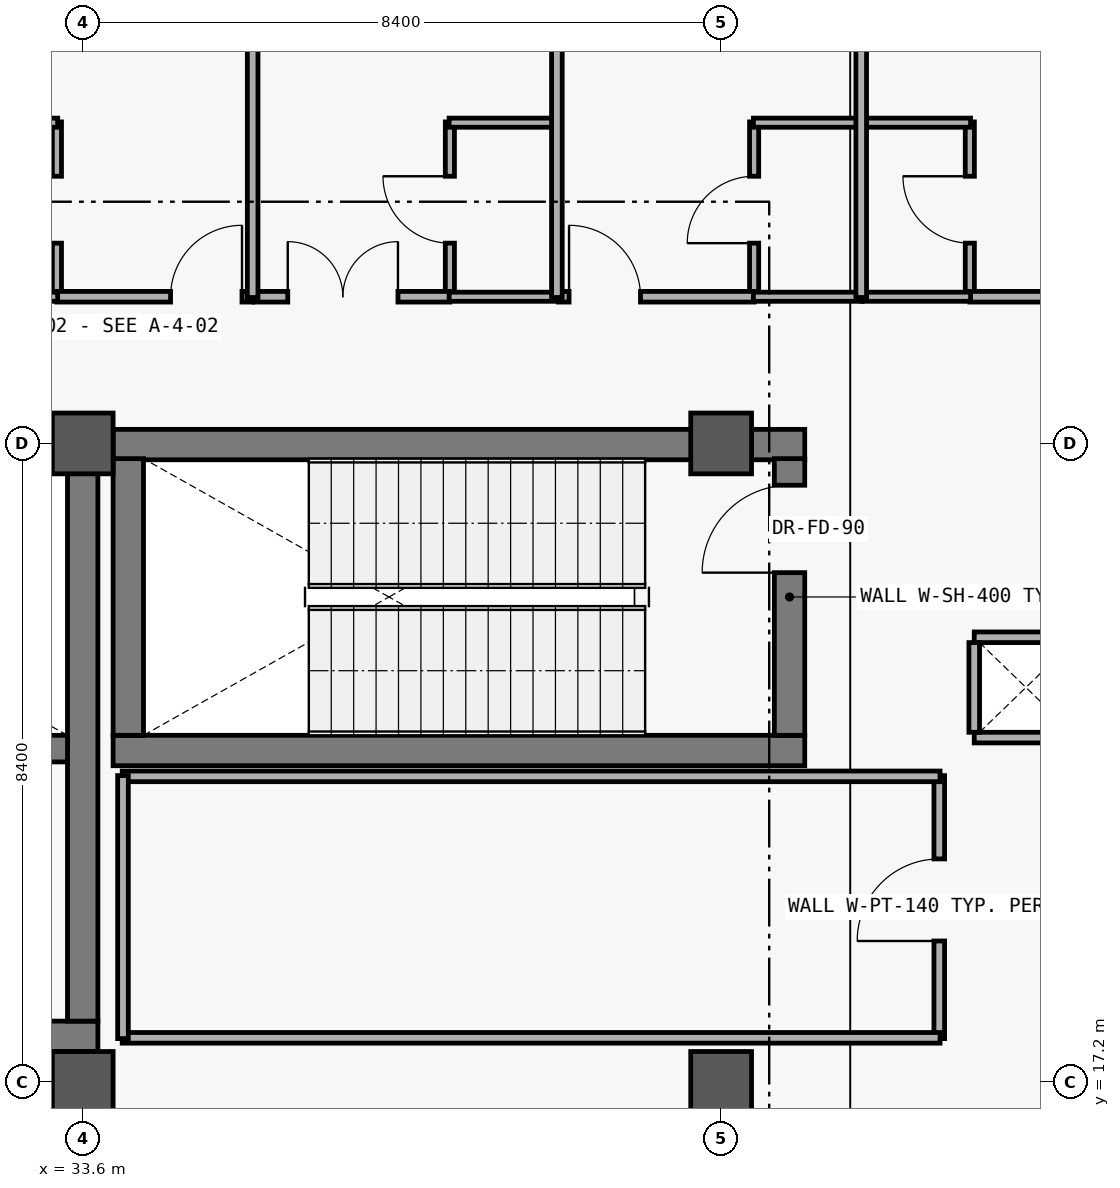
"""IFC4 building model, lengths in metres.
Left out: names, types, materials, properties, quantities, classifications, styles, units other than length and angle.
Written with IfcOpenShell. Run it as: python <this file> out.ifc"""

import sys

from ifc_helpers import new_model, si_unit, direction, frame, frame_2d, origin, origin_2d, place, context, subcontext, project, spatial, rectangle, extrude, element, fill, save


model = new_model("IFC4")
c1 = context("Model", 3, precision=1e-05, world=origin(), true_north=direction((0.0, 1.0)))
c2 = subcontext(c1, "Body", "Model", "MODEL_VIEW")
j1 = project(units=[si_unit("LENGTHUNIT", "METRE"), si_unit("PLANEANGLEUNIT", "RADIAN")], contexts=[c1])
p1 = place(None, origin())
s1 = spatial("IfcSite", under=j1, at=p1, CompositionType="ELEMENT")
p2 = place(p1, origin())
s2 = spatial("IfcBuilding", under=s1, at=p2, CompositionType="ELEMENT")
p3 = place(p2, frame((0.0, 0.0, 5.4)))
s3 = spatial("IfcBuildingStorey", under=s2, at=p3, CompositionType="ELEMENT", Elevation=5.4)
for number, where, z_axis, x_axis in (
    (1, (33.6, 17.2, 0.0), (0.0, 0.0, 1.0), (1.0, 0.0, 0.0)),
    (2, (33.6, 25.6, 0.0), (0.0, 0.0, 1.0), (1.0, 0.0, 0.0)),
    (3, (42.0, 17.2, 0.0), (0.0, 0.0, 1.0), (1.0, 0.0, 0.0)),
    (4, (42.0, 25.6, 0.0), (0.0, 0.0, 1.0), (1.0, 0.0, 0.0)),
):
    element("IfcColumn", number, at=place(p3, frame(where, z_axis=z_axis, x_axis=x_axis)), inside=s3, PredefinedType="COLUMN", context=c2, shape_type="SweptSolid", body=[
        extrude(rectangle(XDim=0.8, YDim=0.8, at=origin_2d()), origin(), (0.0, 0.0, 1.0), 5.4),
    ])
p4 = place(p3, frame((24.6, 17.8, 0.0), z_axis=(0.0, 0.0, 1.0), x_axis=(1.0, 0.0, 0.0)))
e5 = element("IfcWall", 5, at=p4, inside=s3, PredefinedType="SHEAR", context=c2, shape_type="SweptSolid", body=[
    extrude(rectangle(XDim=9.2, YDim=0.4, at=frame_2d((4.6, 0.0))), origin(), (0.0, 0.0, 1.0), 5.08),
])
p5 = place(p4, frame((1.1, 0.0, 0.0)))
e6 = element("IfcOpeningElement", 6, at=p5, cuts=e5, PredefinedType="OPENING", context=c2, shape_type="SweptSolid", body=[
    extrude(rectangle(XDim=1.2, YDim=2.2, at=frame_2d((0.6, 1.1))), frame((0.0, 0.21, 0.0), z_axis=(0.0, -1.0, 0.0), x_axis=(1.0, 0.0, 0.0)), (0.0, 0.0, 1.0), 0.42),
])
p6 = place(p4, frame((3.5, 0.0, 0.0)))
e7 = element("IfcOpeningElement", 7, at=p6, cuts=e5, PredefinedType="OPENING", context=c2, shape_type="SweptSolid", body=[
    extrude(rectangle(XDim=1.1, YDim=2.2, at=frame_2d((0.55, 1.1))), frame((0.0, 0.21, 0.0), z_axis=(0.0, -1.0, 0.0), x_axis=(1.0, 0.0, 0.0)), (0.0, 0.0, 1.0), 0.42),
])
p7 = place(p4, frame((5.9, 0.0, 0.0)))
e8 = element("IfcOpeningElement", 8, at=p7, cuts=e5, PredefinedType="OPENING", context=c2, shape_type="SweptSolid", body=[
    extrude(rectangle(XDim=1.1, YDim=2.2, at=frame_2d((0.55, 1.1))), frame((0.0, 0.21, 0.0), z_axis=(0.0, -1.0, 0.0), x_axis=(1.0, 0.0, 0.0)), (0.0, 0.0, 1.0), 0.42),
])
p8 = place(p3, frame((33.8, 25.585, 0.0), z_axis=(0.0, 0.0, 1.0), x_axis=(-1.0, 0.0, 0.0)))
e9 = element("IfcWall", 9, at=p8, inside=s3, PredefinedType="SHEAR", context=c2, shape_type="SweptSolid", body=[
    extrude(rectangle(XDim=9.2, YDim=0.4, at=frame_2d((4.6, 0.0))), origin(), (0.0, 0.0, 1.0), 5.08),
])
p9 = place(p3, frame((33.6, 18.0, 0.0), z_axis=(0.0, 0.0, 1.0), x_axis=(0.0, 1.0, 0.0)))
e10 = element("IfcWall", 10, at=p9, inside=s3, PredefinedType="SHEAR", context=c2, shape_type="SweptSolid", body=[
    extrude(rectangle(XDim=7.4, YDim=0.4, at=frame_2d((3.7, 0.0))), origin(), (0.0, 0.0, 1.0), 5.08),
])
p10 = place(p3, frame((25.0, 21.585, 0.0), z_axis=(0.0, 0.0, 1.0), x_axis=(1.0, 0.0, 0.0)))
e11 = element("IfcWall", 11, at=p10, inside=s3, PredefinedType="SHEAR", context=c2, shape_type="SweptSolid", body=[
    extrude(rectangle(XDim=8.4, YDim=0.35, at=frame_2d((4.2, 0.0))), origin(), (0.0, 0.0, 1.0), 5.08),
])
for number, where, z_axis, x_axis in (
    (12, (34.0, 21.56, 0.0), (0.0, 0.0, 1.0), (1.0, 0.0, 0.0)),
    (13, (43.1, 25.585, 0.0), (0.0, 0.0, 1.0), (-1.0, 0.0, 0.0)),
):
    element("IfcWall", number, at=place(p3, frame(where, z_axis=z_axis, x_axis=x_axis)), inside=s3, PredefinedType="SHEAR", context=c2, shape_type="SweptSolid", body=[
        extrude(rectangle(XDim=9.1, YDim=0.4, at=frame_2d((4.55, 0.0))), origin(), (0.0, 0.0, 1.0), 5.08),
    ])
p11 = place(p3, frame((34.2, 25.4, 0.0), z_axis=(0.0, 0.0, 1.0), x_axis=(0.0, -1.0, 0.0)))
e14 = element("IfcWall", 14, at=p11, inside=s3, PredefinedType="SHEAR", context=c2, shape_type="SweptSolid", body=[
    extrude(rectangle(XDim=3.64, YDim=0.4, at=frame_2d((1.82, 0.0))), origin(), (0.0, 0.0, 1.0), 5.08),
])
p12 = place(p3, frame((42.9, 21.76, 0.0), z_axis=(0.0, 0.0, 1.0), x_axis=(0.0, 1.0, 0.0)))
e15 = element("IfcWall", 15, at=p12, inside=s3, PredefinedType="SHEAR", context=c2, shape_type="SweptSolid", body=[
    extrude(rectangle(XDim=3.64, YDim=0.4, at=frame_2d((1.82, 0.0))), origin(), (0.0, 0.0, 1.0), 5.08),
])
p13 = place(p12, frame((2.14, 0.0, 0.0)))
e16 = element("IfcOpeningElement", 16, at=p13, cuts=e15, PredefinedType="OPENING", context=c2, shape_type="SweptSolid", body=[
    extrude(rectangle(XDim=1.15, YDim=2.2, at=frame_2d((0.575, 1.1))), frame((0.0, 0.21, 0.0), z_axis=(0.0, -1.0, 0.0), x_axis=(1.0, 0.0, 0.0)), (0.0, 0.0, 1.0), 0.42),
])
p14 = place(p3, frame((33.261, 27.52, 0.0), z_axis=(0.0, 0.0, 1.0), x_axis=(0.0, 1.0, 0.0)))
e17 = element("IfcWall", 17, at=p14, inside=s3, PredefinedType="PARTITIONING", context=c2, shape_type="SweptSolid", body=[
    extrude(rectangle(XDim=2.31, YDim=0.12, at=frame_2d((1.155, 0.0))), origin(), (0.0, 0.0, 1.0), 4.18),
])
p15 = place(p14, frame((0.715, 0.0, 0.0)))
e18 = element("IfcOpeningElement", 18, at=p15, cuts=e17, PredefinedType="OPENING", context=c2, shape_type="SweptSolid", body=[
    extrude(rectangle(XDim=0.88, YDim=2.15, at=frame_2d((0.44, 1.075))), frame((0.0, 0.07, 0.0), z_axis=(0.0, -1.0, 0.0), x_axis=(1.0, 0.0, 0.0)), (0.0, 0.0, 1.0), 0.14),
])
p16 = place(p3, frame((38.431, 27.52, 0.0), z_axis=(0.0, 0.0, 1.0), x_axis=(0.0, 1.0, 0.0)))
e19 = element("IfcWall", 19, at=p16, inside=s3, PredefinedType="PARTITIONING", context=c2, shape_type="SweptSolid", body=[
    extrude(rectangle(XDim=2.31, YDim=0.12, at=frame_2d((1.155, 0.0))), origin(), (0.0, 0.0, 1.0), 4.18),
])
p17 = place(p16, frame((0.715, 0.0, 0.0)))
e20 = element("IfcOpeningElement", 20, at=p17, cuts=e19, PredefinedType="OPENING", context=c2, shape_type="SweptSolid", body=[
    extrude(rectangle(XDim=0.88, YDim=2.15, at=frame_2d((0.44, 1.075))), frame((0.0, 0.07, 0.0), z_axis=(0.0, -1.0, 0.0), x_axis=(1.0, 0.0, 0.0)), (0.0, 0.0, 1.0), 0.14),
])
p18 = place(p3, frame((42.434, 27.52, 0.0), z_axis=(0.0, 0.0, 1.0), x_axis=(0.0, 1.0, 0.0)))
e21 = element("IfcWall", 21, at=p18, inside=s3, PredefinedType="PARTITIONING", context=c2, shape_type="SweptSolid", body=[
    extrude(rectangle(XDim=2.31, YDim=0.12, at=frame_2d((1.155, 0.0))), origin(), (0.0, 0.0, 1.0), 4.18),
])
p19 = place(p18, frame((0.715, 0.0, 0.0)))
e22 = element("IfcOpeningElement", 22, at=p19, cuts=e21, PredefinedType="OPENING", context=c2, shape_type="SweptSolid", body=[
    extrude(rectangle(XDim=0.88, YDim=2.15, at=frame_2d((0.44, 1.075))), frame((0.0, 0.07, 0.0), z_axis=(0.0, -1.0, 0.0), x_axis=(1.0, 0.0, 0.0)), (0.0, 0.0, 1.0), 0.14),
])
p20 = place(p3, frame((45.272, 27.52, 0.0), z_axis=(0.0, 0.0, 1.0), x_axis=(0.0, 1.0, 0.0)))
e23 = element("IfcWall", 23, at=p20, inside=s3, PredefinedType="PARTITIONING", context=c2, shape_type="SweptSolid", body=[
    extrude(rectangle(XDim=2.31, YDim=0.12, at=frame_2d((1.155, 0.0))), origin(), (0.0, 0.0, 1.0), 4.18),
])
p21 = place(p20, frame((0.715, 0.0, 0.0)))
e24 = element("IfcOpeningElement", 24, at=p21, cuts=e23, PredefinedType="OPENING", context=c2, shape_type="SweptSolid", body=[
    extrude(rectangle(XDim=0.88, YDim=2.15, at=frame_2d((0.44, 1.075))), frame((0.0, 0.07, 0.0), z_axis=(0.0, -1.0, 0.0), x_axis=(1.0, 0.0, 0.0)), (0.0, 0.0, 1.0), 0.14),
])
p22 = place(p3, frame((44.87, 17.77, 0.0), z_axis=(0.0, 0.0, 1.0), x_axis=(0.0, 1.0, 0.0)))
e25 = element("IfcWall", 25, at=p22, inside=s3, PredefinedType="PARTITIONING", context=c2, shape_type="SweptSolid", body=[
    extrude(rectangle(XDim=3.46, YDim=0.14, at=frame_2d((1.73, 0.0))), origin(), (0.0, 0.0, 1.0), 4.18),
])
p23 = place(p22, frame((1.284, 0.0, 0.0)))
e26 = element("IfcOpeningElement", 26, at=p23, cuts=e25, PredefinedType="OPENING", context=c2, shape_type="SweptSolid", body=[
    extrude(rectangle(XDim=1.08, YDim=2.25, at=frame_2d((0.54, 1.125))), frame((0.0, 0.08, 0.0), z_axis=(0.0, -1.0, 0.0), x_axis=(1.0, 0.0, 0.0)), (0.0, 0.0, 1.0), 0.16),
])
p24 = place(p3, frame((33.261, 27.53, 0.0), z_axis=(0.0, 0.0, 1.0), x_axis=(1.0, 0.0, 0.0)))
e27 = element("IfcWall", 27, at=p24, inside=s3, PredefinedType="PARTITIONING", context=c2, shape_type="SweptSolid", body=[
    extrude(rectangle(XDim=2.575, YDim=0.14, at=frame_2d((1.288, 0.0))), origin(), (0.0, 0.0, 1.0), 4.18),
])
p25 = place(p24, frame((1.495, 0.0, 0.0)))
e28 = element("IfcOpeningElement", 28, at=p25, cuts=e27, PredefinedType="OPENING", context=c2, shape_type="SweptSolid", body=[
    extrude(rectangle(XDim=0.94, YDim=2.2, at=frame_2d((0.47, 1.1))), frame((0.0, 0.08, 0.0), z_axis=(0.0, -1.0, 0.0), x_axis=(1.0, 0.0, 0.0)), (0.0, 0.0, 1.0), 0.16),
])
p26 = place(p3, frame((35.856, 27.53, 0.0), z_axis=(0.0, 0.0, 1.0), x_axis=(1.0, 0.0, 0.0)))
e29 = element("IfcWall", 29, at=p26, inside=s3, PredefinedType="PARTITIONING", context=c2, shape_type="SweptSolid", body=[
    extrude(rectangle(XDim=2.575, YDim=0.14, at=frame_2d((1.288, 0.0))), origin(), (0.0, 0.0, 1.0), 4.18),
])
p27 = place(p26, frame((0.442, 0.0, 0.0)))
e30 = element("IfcOpeningElement", 30, at=p27, cuts=e29, PredefinedType="OPENING", context=c2, shape_type="SweptSolid", body=[
    extrude(rectangle(XDim=1.45, YDim=2.3, at=frame_2d((0.725, 1.15))), frame((0.0, 0.08, 0.0), z_axis=(0.0, -1.0, 0.0), x_axis=(1.0, 0.0, 0.0)), (0.0, 0.0, 1.0), 0.16),
])
p28 = place(p3, frame((39.859, 27.53, 0.0), z_axis=(0.0, 0.0, 1.0), x_axis=(1.0, 0.0, 0.0)))
e31 = element("IfcWall", 31, at=p28, inside=s3, PredefinedType="PARTITIONING", context=c2, shape_type="SweptSolid", body=[
    extrude(rectangle(XDim=2.575, YDim=0.14, at=frame_2d((1.288, 0.0))), origin(), (0.0, 0.0, 1.0), 4.18),
])
p29 = place(p28, frame((0.14, 0.0, 0.0)))
e32 = element("IfcOpeningElement", 32, at=p29, cuts=e31, PredefinedType="OPENING", context=c2, shape_type="SweptSolid", body=[
    extrude(rectangle(XDim=0.94, YDim=2.2, at=frame_2d((0.47, 1.1))), frame((0.0, 0.08, 0.0), z_axis=(0.0, -1.0, 0.0), x_axis=(1.0, 0.0, 0.0)), (0.0, 0.0, 1.0), 0.16),
])
p30 = place(p3, frame((45.272, 27.53, 0.0), z_axis=(0.0, 0.0, 1.0), x_axis=(1.0, 0.0, 0.0)))
e33 = element("IfcWall", 33, at=p30, inside=s3, PredefinedType="PARTITIONING", context=c2, shape_type="SweptSolid", body=[
    extrude(rectangle(XDim=2.575, YDim=0.14, at=frame_2d((1.288, 0.0))), origin(), (0.0, 0.0, 1.0), 4.18),
])
p31 = place(p30, frame((1.495, 0.0, 0.0)))
e34 = element("IfcOpeningElement", 34, at=p31, cuts=e33, PredefinedType="OPENING", context=c2, shape_type="SweptSolid", body=[
    extrude(rectangle(XDim=0.94, YDim=2.2, at=frame_2d((0.47, 1.1))), frame((0.0, 0.08, 0.0), z_axis=(0.0, -1.0, 0.0), x_axis=(1.0, 0.0, 0.0)), (0.0, 0.0, 1.0), 0.16),
])
for number, where, z_axis, x_axis in (
    (35, (31.842, 27.53, 0.0), (0.0, 0.0, 1.0), (1.0, 0.0, 0.0)),
    (36, (31.842, 29.82, 0.0), (0.0, 0.0, 1.0), (1.0, 0.0, 0.0)),
):
    element("IfcWall", number, at=place(p3, frame(where, z_axis=z_axis, x_axis=x_axis)), inside=s3, PredefinedType="PARTITIONING", context=c2, shape_type="SweptSolid", body=[
        extrude(rectangle(XDim=1.429, YDim=0.12, at=frame_2d((0.714, 0.0))), origin(), (0.0, 0.0, 1.0), 4.18),
    ])
for number, where, z_axis, x_axis in (
    (37, (38.421, 27.53, 0.0), (0.0, 0.0, 1.0), (1.0, 0.0, 0.0)),
    (38, (38.421, 29.82, 0.0), (0.0, 0.0, 1.0), (1.0, 0.0, 0.0)),
):
    element("IfcWall", number, at=place(p3, frame(where, z_axis=z_axis, x_axis=x_axis)), inside=s3, PredefinedType="PARTITIONING", context=c2, shape_type="SweptSolid", body=[
        extrude(rectangle(XDim=1.428, YDim=0.12, at=frame_2d((0.714, 0.0))), origin(), (0.0, 0.0, 1.0), 4.18),
    ])
for number, where, z_axis, x_axis in (
    (39, (42.424, 27.53, 0.0), (0.0, 0.0, 1.0), (1.0, 0.0, 0.0)),
    (40, (42.424, 29.82, 0.0), (0.0, 0.0, 1.0), (1.0, 0.0, 0.0)),
    (41, (43.853, 27.53, 0.0), (0.0, 0.0, 1.0), (1.0, 0.0, 0.0)),
    (42, (43.853, 29.82, 0.0), (0.0, 0.0, 1.0), (1.0, 0.0, 0.0)),
):
    element("IfcWall", number, at=place(p3, frame(where, z_axis=z_axis, x_axis=x_axis)), inside=s3, PredefinedType="PARTITIONING", context=c2, shape_type="SweptSolid", body=[
        extrude(rectangle(XDim=1.429, YDim=0.12, at=frame_2d((0.714, 0.0))), origin(), (0.0, 0.0, 1.0), 4.18),
    ])
for number, where, z_axis, x_axis in (
    (43, (34.12, 17.78, 0.0), (0.0, 0.0, 1.0), (1.0, 0.0, 0.0)),
    (44, (34.12, 21.22, 0.0), (0.0, 0.0, 1.0), (1.0, 0.0, 0.0)),
):
    element("IfcWall", number, at=place(p3, frame(where, z_axis=z_axis, x_axis=x_axis)), inside=s3, PredefinedType="PARTITIONING", context=c2, shape_type="SweptSolid", body=[
        extrude(rectangle(XDim=10.76, YDim=0.14, at=frame_2d((5.38, 0.0))), origin(), (0.0, 0.0, 1.0), 4.18),
    ])
p32 = place(p3, frame((34.13, 17.77, 0.0), z_axis=(0.0, 0.0, 1.0), x_axis=(0.0, 1.0, 0.0)))
e45 = element("IfcWall", 45, at=p32, inside=s3, PredefinedType="PARTITIONING", context=c2, shape_type="SweptSolid", body=[
    extrude(rectangle(XDim=3.46, YDim=0.14, at=frame_2d((1.73, 0.0))), origin(), (0.0, 0.0, 1.0), 4.18),
])
for number, where, z_axis, x_axis in (
    (46, (35.836, 27.52, 0.0), (0.0, 0.0, 1.0), (0.0, 1.0, 0.0)),
    (47, (39.839, 27.52, 0.0), (0.0, 0.0, 1.0), (0.0, 1.0, 0.0)),
    (48, (43.843, 27.52, 0.0), (0.0, 0.0, 1.0), (0.0, 1.0, 0.0)),
):
    element("IfcWall", number, at=place(p3, frame(where, z_axis=z_axis, x_axis=x_axis)), inside=s3, PredefinedType="PARTITIONING", context=c2, shape_type="SweptSolid", body=[
        extrude(rectangle(XDim=6.14, YDim=0.14, at=frame_2d((3.07, 0.0))), origin(), (0.0, 0.0, 1.0), 4.18),
    ])
for number, where, z_axis, x_axis in (
    (49, (45.33, 21.73, 0.0), (0.0, 0.0, 1.0), (1.0, 0.0, 0.0)),
    (50, (46.69, 23.05, 0.0), (0.0, 0.0, 1.0), (-1.0, 0.0, 0.0)),
):
    element("IfcWall", number, at=place(p3, frame(where, z_axis=z_axis, x_axis=x_axis)), inside=s3, PredefinedType="PARTITIONING", context=c2, shape_type="SweptSolid", body=[
        extrude(rectangle(XDim=1.36, YDim=0.14, at=frame_2d((0.68, 0.0))), origin(), (0.0, 0.0, 1.0), 4.2),
    ])
p33 = place(p3, frame((45.33, 22.98, 0.0), z_axis=(0.0, 0.0, 1.0), x_axis=(0.0, -1.0, 0.0)))
e51 = element("IfcWall", 51, at=p33, inside=s3, PredefinedType="PARTITIONING", context=c2, shape_type="SweptSolid", body=[
    extrude(rectangle(XDim=1.18, YDim=0.14, at=frame_2d((0.59, 0.0))), origin(), (0.0, 0.0, 1.0), 4.2),
])
p34 = place(p13, origin())
e52 = element("IfcDoor", 52, at=p34, inside=s3, OperationType="SINGLE_SWING_LEFT", PredefinedType="DOOR", context=c2, shape_type="SweptSolid", body=[
    extrude(rectangle(XDim=1.15, YDim=2.2, at=frame_2d((0.575, 1.1))), frame((0.0, 0.025, 0.0), z_axis=(0.0, -1.0, 0.0), x_axis=(1.0, 0.0, 0.0)), (0.0, 0.0, 1.0), 0.05),
])
fill(e16, e52)
p35 = place(p15, origin())
e53 = element("IfcDoor", 53, at=p35, inside=s3, OperationType="SINGLE_SWING_LEFT", PredefinedType="DOOR", context=c2, shape_type="SweptSolid", body=[
    extrude(rectangle(XDim=0.88, YDim=2.15, at=frame_2d((0.44, 1.075))), frame((0.0, 0.025, 0.0), z_axis=(0.0, -1.0, 0.0), x_axis=(1.0, 0.0, 0.0)), (0.0, 0.0, 1.0), 0.05),
])
fill(e18, e53)
p36 = place(p17, origin())
e54 = element("IfcDoor", 54, at=p36, inside=s3, OperationType="SINGLE_SWING_RIGHT", PredefinedType="DOOR", context=c2, shape_type="SweptSolid", body=[
    extrude(rectangle(XDim=0.88, YDim=2.15, at=frame_2d((0.44, 1.075))), frame((0.0, 0.025, 0.0), z_axis=(0.0, -1.0, 0.0), x_axis=(1.0, 0.0, 0.0)), (0.0, 0.0, 1.0), 0.05),
])
fill(e20, e54)
p37 = place(p19, origin())
e55 = element("IfcDoor", 55, at=p37, inside=s3, OperationType="SINGLE_SWING_LEFT", PredefinedType="DOOR", context=c2, shape_type="SweptSolid", body=[
    extrude(rectangle(XDim=0.88, YDim=2.15, at=frame_2d((0.44, 1.075))), frame((0.0, 0.025, 0.0), z_axis=(0.0, -1.0, 0.0), x_axis=(1.0, 0.0, 0.0)), (0.0, 0.0, 1.0), 0.05),
])
fill(e22, e55)
p38 = place(p21, origin())
e56 = element("IfcDoor", 56, at=p38, inside=s3, OperationType="SINGLE_SWING_RIGHT", PredefinedType="DOOR", context=c2, shape_type="SweptSolid", body=[
    extrude(rectangle(XDim=0.88, YDim=2.15, at=frame_2d((0.44, 1.075))), frame((0.0, 0.025, 0.0), z_axis=(0.0, -1.0, 0.0), x_axis=(1.0, 0.0, 0.0)), (0.0, 0.0, 1.0), 0.05),
])
fill(e24, e56)
p39 = place(p23, origin())
e57 = element("IfcDoor", 57, at=p39, inside=s3, OperationType="SINGLE_SWING_LEFT", PredefinedType="DOOR", context=c2, shape_type="SweptSolid", body=[
    extrude(rectangle(XDim=1.08, YDim=2.25, at=frame_2d((0.54, 1.125))), frame((0.0, 0.025, 0.0), z_axis=(0.0, -1.0, 0.0), x_axis=(1.0, 0.0, 0.0)), (0.0, 0.0, 1.0), 0.05),
])
fill(e26, e57)
p40 = place(p25, origin())
e58 = element("IfcDoor", 58, at=p40, inside=s3, OperationType="SINGLE_SWING_RIGHT", PredefinedType="DOOR", context=c2, shape_type="SweptSolid", body=[
    extrude(rectangle(XDim=0.94, YDim=2.2, at=frame_2d((0.47, 1.1))), frame((0.0, 0.025, 0.0), z_axis=(0.0, -1.0, 0.0), x_axis=(1.0, 0.0, 0.0)), (0.0, 0.0, 1.0), 0.05),
])
fill(e28, e58)
p41 = place(p27, origin())
e59 = element("IfcDoor", 59, at=p41, inside=s3, OperationType="DOUBLE_DOOR_SINGLE_SWING", PredefinedType="DOOR", context=c2, shape_type="SweptSolid", body=[
    extrude(rectangle(XDim=1.45, YDim=2.3, at=frame_2d((0.725, 1.15))), frame((0.0, 0.025, 0.0), z_axis=(0.0, -1.0, 0.0), x_axis=(1.0, 0.0, 0.0)), (0.0, 0.0, 1.0), 0.05),
])
fill(e30, e59)
p42 = place(p29, origin())
e60 = element("IfcDoor", 60, at=p42, inside=s3, OperationType="SINGLE_SWING_LEFT", PredefinedType="DOOR", context=c2, shape_type="SweptSolid", body=[
    extrude(rectangle(XDim=0.94, YDim=2.2, at=frame_2d((0.47, 1.1))), frame((0.0, 0.025, 0.0), z_axis=(0.0, -1.0, 0.0), x_axis=(1.0, 0.0, 0.0)), (0.0, 0.0, 1.0), 0.05),
])
fill(e32, e60)
save(model, sys.argv[1])
